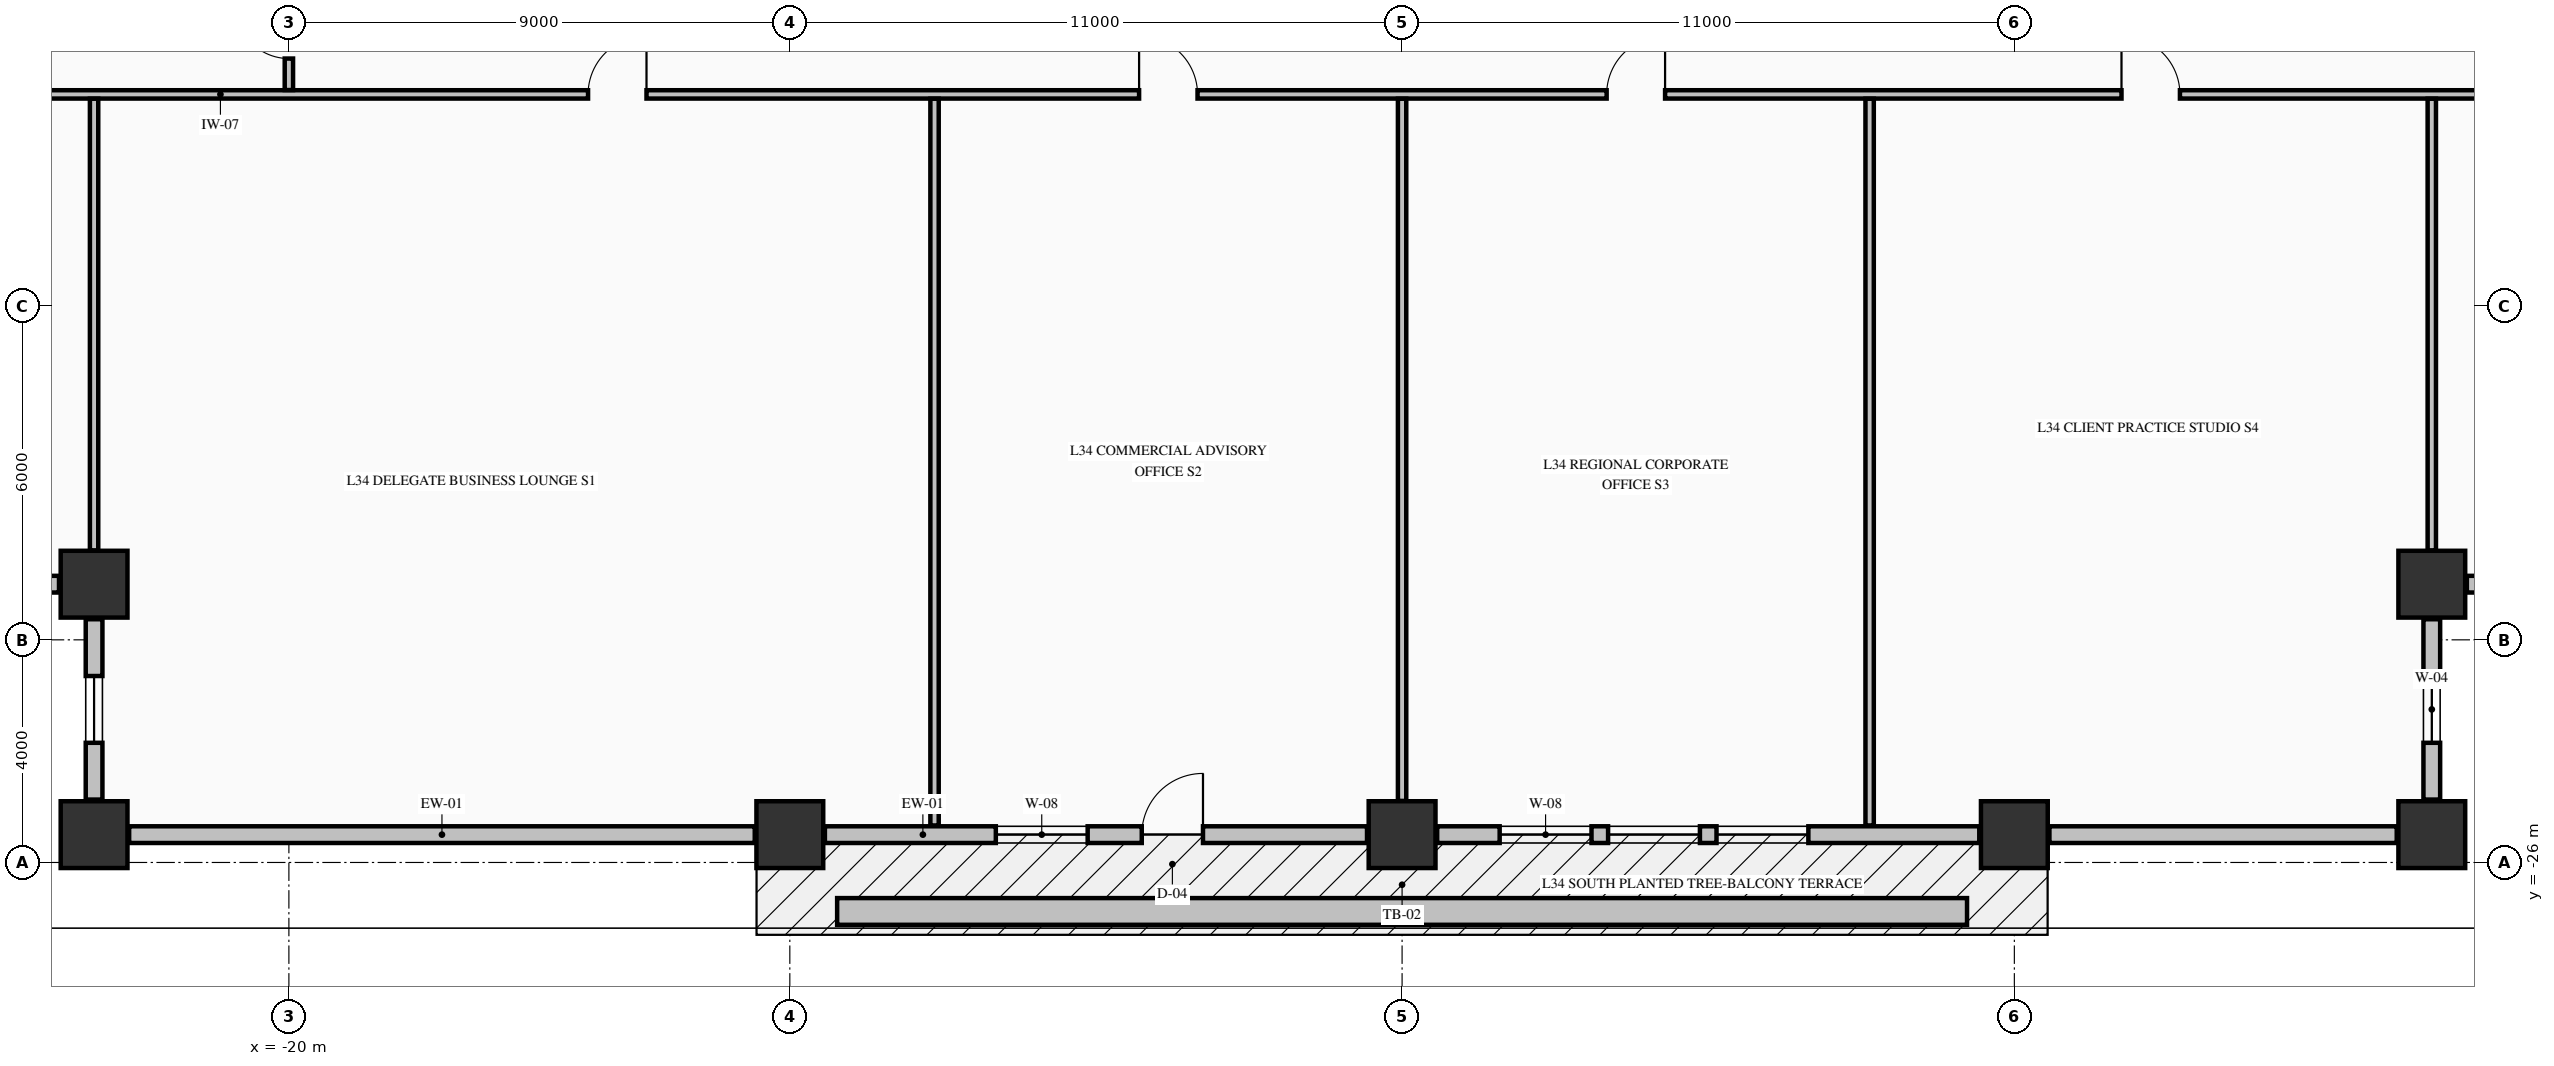
"""IFC4 building model, lengths in metres.
Left out: names, types, materials, properties, quantities, classifications, styles, units other than length and angle.
Written with IfcOpenShell. Run it as: python <this file> out.ifc"""

import sys

from ifc_helpers import new_model, si_unit, direction, frame, frame_2d, origin, origin_2d, place, context, subcontext, project, spatial, rectangle, extrude, element, fill, save


model = new_model("IFC4")
c1 = context("Model", 3, precision=1e-05, world=origin(), true_north=direction((0.0, 1.0)))
c2 = subcontext(c1, "Body", "Model", "MODEL_VIEW")
j1 = project(units=[si_unit("LENGTHUNIT", "METRE"), si_unit("PLANEANGLEUNIT", "RADIAN")], contexts=[c1])
p1 = place(None, origin())
s1 = spatial("IfcSite", under=j1, at=p1, CompositionType="ELEMENT")
p2 = place(p1, origin())
s2 = spatial("IfcBuilding", under=s1, at=p2, CompositionType="ELEMENT")
p3 = place(p2, frame((0.0, 0.0, 135.63)))
s3 = spatial("IfcBuildingStorey", under=s2, at=p3, CompositionType="ELEMENT", Elevation=135.63)
for number, where, z_axis, x_axis in (
    (1, (-23.5, -25.5, -0.25), (0.0, 0.0, 1.0), (1.0, 0.0, 0.0)),
    (2, (-11.0, -25.5, -0.25), (0.0, 0.0, 1.0), (1.0, 0.0, 0.0)),
    (3, (0.0, -25.5, -0.25), (0.0, 0.0, 1.0), (1.0, 0.0, 0.0)),
    (4, (11.0, -25.5, -0.25), (0.0, 0.0, 1.0), (1.0, 0.0, 0.0)),
    (5, (18.5, -25.5, -0.25), (0.0, 0.0, 1.0), (1.0, 0.0, 0.0)),
    (6, (-23.5, -21.0, -0.25), (0.0, 0.0, 1.0), (1.0, 0.0, 0.0)),
    (7, (18.5, -21.0, -0.25), (0.0, 0.0, 1.0), (1.0, 0.0, 0.0)),
):
    element("IfcColumn", number, at=place(p3, frame(where, z_axis=z_axis, x_axis=x_axis)), inside=s3, PredefinedType="COLUMN", context=c2, shape_type="SweptSolid", body=[
        extrude(rectangle(XDim=1.2, YDim=1.2, at=origin_2d()), origin(), (0.0, 0.0, 1.0), 3.57),
    ])
p4 = place(p3, frame((18.5, -24.87, 0.0), z_axis=(0.0, 0.0, 1.0), x_axis=(0.0, 1.0, 0.0)))
e8 = element("IfcWall", 8, at=p4, inside=s3, PredefinedType="STANDARD", context=c2, shape_type="SweptSolid", body=[
    extrude(rectangle(XDim=3.24, YDim=0.3, at=frame_2d((1.62, 0.0))), origin(), (0.0, 0.0, 1.0), 2.712),
])
p5 = place(p4, frame((1.02, 0.0, 0.82)))
e9 = element("IfcOpeningElement", 9, at=p5, cuts=e8, PredefinedType="OPENING", context=c2, shape_type="SweptSolid", body=[
    extrude(rectangle(XDim=1.2, YDim=1.65, at=frame_2d((0.6, 0.825))), frame((0.0, 0.16, 0.0), z_axis=(0.0, -1.0, 0.0), x_axis=(1.0, 0.0, 0.0)), (0.0, 0.0, 1.0), 0.32),
])
p6 = place(p3, frame((19.13, -21.0, 0.0), z_axis=(0.0, 0.0, 1.0), x_axis=(1.0, 0.0, 0.0)))
e10 = element("IfcWall", 10, at=p6, inside=s3, PredefinedType="STANDARD", context=c2, shape_type="SweptSolid", body=[
    extrude(rectangle(XDim=3.24, YDim=0.3, at=frame_2d((1.62, 0.0))), origin(), (0.0, 0.0, 1.0), 2.712),
])
p7 = place(p6, frame((1.02, 0.0, 0.82)))
e11 = element("IfcOpeningElement", 11, at=p7, cuts=e10, PredefinedType="OPENING", context=c2, shape_type="SweptSolid", body=[
    extrude(rectangle(XDim=1.2, YDim=1.65, at=frame_2d((0.6, 0.825))), frame((0.0, 0.16, 0.0), z_axis=(0.0, -1.0, 0.0), x_axis=(1.0, 0.0, 0.0)), (0.0, 0.0, 1.0), 0.32),
])
p8 = place(p3, frame((-27.37, -21.0, 0.0), z_axis=(0.0, 0.0, 1.0), x_axis=(1.0, 0.0, 0.0)))
e12 = element("IfcWall", 12, at=p8, inside=s3, PredefinedType="STANDARD", context=c2, shape_type="SweptSolid", body=[
    extrude(rectangle(XDim=3.24, YDim=0.3, at=frame_2d((1.62, 0.0))), origin(), (0.0, 0.0, 1.0), 2.712),
])
p9 = place(p8, frame((1.02, 0.0, 0.82)))
e13 = element("IfcOpeningElement", 13, at=p9, cuts=e12, PredefinedType="OPENING", context=c2, shape_type="SweptSolid", body=[
    extrude(rectangle(XDim=1.2, YDim=1.65, at=frame_2d((0.6, 0.825))), frame((0.0, 0.16, 0.0), z_axis=(0.0, -1.0, 0.0), x_axis=(1.0, 0.0, 0.0)), (0.0, 0.0, 1.0), 0.32),
])
p10 = place(p3, frame((-23.5, -21.63, 0.0), z_axis=(0.0, 0.0, 1.0), x_axis=(0.0, -1.0, 0.0)))
e14 = element("IfcWall", 14, at=p10, inside=s3, PredefinedType="STANDARD", context=c2, shape_type="SweptSolid", body=[
    extrude(rectangle(XDim=3.24, YDim=0.3, at=frame_2d((1.62, 0.0))), origin(), (0.0, 0.0, 1.0), 2.712),
])
p11 = place(p10, frame((1.02, 0.0, 0.82)))
e15 = element("IfcOpeningElement", 15, at=p11, cuts=e14, PredefinedType="OPENING", context=c2, shape_type="SweptSolid", body=[
    extrude(rectangle(XDim=1.2, YDim=1.65, at=frame_2d((0.6, 0.825))), frame((0.0, 0.16, 0.0), z_axis=(0.0, -1.0, 0.0), x_axis=(1.0, 0.0, 0.0)), (0.0, 0.0, 1.0), 0.32),
])
p12 = place(p3, frame((-22.87, -25.5, 0.0), z_axis=(0.0, 0.0, 1.0), x_axis=(1.0, 0.0, 0.0)))
e16 = element("IfcWall", 16, at=p12, inside=s3, PredefinedType="STANDARD", context=c2, shape_type="SweptSolid", body=[
    extrude(rectangle(XDim=11.24, YDim=0.3, at=frame_2d((5.62, 0.0))), origin(), (0.0, 0.0, 1.0), 2.712),
])
p13 = place(p3, frame((-10.37, -25.5, 0.0), z_axis=(0.0, 0.0, 1.0), x_axis=(1.0, 0.0, 0.0)))
e17 = element("IfcWall", 17, at=p13, inside=s3, PredefinedType="STANDARD", context=c2, shape_type="SweptSolid", body=[
    extrude(rectangle(XDim=9.74, YDim=0.3, at=frame_2d((4.87, 0.0))), origin(), (0.0, 0.0, 1.0), 2.712),
])
p14 = place(p13, frame((5.693, 0.0, 0.0)))
e18 = element("IfcOpeningElement", 18, at=p14, cuts=e17, PredefinedType="OPENING", context=c2, shape_type="SweptSolid", body=[
    extrude(rectangle(XDim=1.1, YDim=2.15, at=frame_2d((0.55, 1.075))), frame((0.0, 0.16, 0.0), z_axis=(0.0, -1.0, 0.0), x_axis=(1.0, 0.0, 0.0)), (0.0, 0.0, 1.0), 0.32),
])
p15 = place(p13, frame((3.071, 0.0, 0.8)))
e19 = element("IfcOpeningElement", 19, at=p15, cuts=e17, PredefinedType="OPENING", context=c2, shape_type="SweptSolid", body=[
    extrude(rectangle(XDim=1.65, YDim=1.7, at=frame_2d((0.825, 0.85))), frame((0.0, 0.16, 0.0), z_axis=(0.0, -1.0, 0.0), x_axis=(1.0, 0.0, 0.0)), (0.0, 0.0, 1.0), 0.32),
])
p16 = place(p3, frame((0.63, -25.5, 0.0), z_axis=(0.0, 0.0, 1.0), x_axis=(1.0, 0.0, 0.0)))
e20 = element("IfcWall", 20, at=p16, inside=s3, PredefinedType="STANDARD", context=c2, shape_type="SweptSolid", body=[
    extrude(rectangle(XDim=9.74, YDim=0.3, at=frame_2d((4.87, 0.0))), origin(), (0.0, 0.0, 1.0), 2.712),
])
p17 = place(p16, frame((1.123, 0.0, 0.8)))
e21 = element("IfcOpeningElement", 21, at=p17, cuts=e20, PredefinedType="OPENING", context=c2, shape_type="SweptSolid", body=[
    extrude(rectangle(XDim=1.65, YDim=1.7, at=frame_2d((0.825, 0.85))), frame((0.0, 0.16, 0.0), z_axis=(0.0, -1.0, 0.0), x_axis=(1.0, 0.0, 0.0)), (0.0, 0.0, 1.0), 0.32),
])
p18 = place(p16, frame((3.071, 0.0, 0.8)))
e22 = element("IfcOpeningElement", 22, at=p18, cuts=e20, PredefinedType="OPENING", context=c2, shape_type="SweptSolid", body=[
    extrude(rectangle(XDim=1.65, YDim=1.7, at=frame_2d((0.825, 0.85))), frame((0.0, 0.16, 0.0), z_axis=(0.0, -1.0, 0.0), x_axis=(1.0, 0.0, 0.0)), (0.0, 0.0, 1.0), 0.32),
])
p19 = place(p16, frame((5.019, 0.0, 0.8)))
e23 = element("IfcOpeningElement", 23, at=p19, cuts=e20, PredefinedType="OPENING", context=c2, shape_type="SweptSolid", body=[
    extrude(rectangle(XDim=1.65, YDim=1.7, at=frame_2d((0.825, 0.85))), frame((0.0, 0.16, 0.0), z_axis=(0.0, -1.0, 0.0), x_axis=(1.0, 0.0, 0.0)), (0.0, 0.0, 1.0), 0.32),
])
p20 = place(p3, frame((11.63, -25.5, 0.0), z_axis=(0.0, 0.0, 1.0), x_axis=(1.0, 0.0, 0.0)))
e24 = element("IfcWall", 24, at=p20, inside=s3, PredefinedType="STANDARD", context=c2, shape_type="SweptSolid", body=[
    extrude(rectangle(XDim=6.24, YDim=0.3, at=frame_2d((3.12, 0.0))), origin(), (0.0, 0.0, 1.0), 2.712),
])
p21 = place(p3, frame((-27.835, -12.2, 0.0), z_axis=(0.0, 0.0, 1.0), x_axis=(1.0, 0.0, 0.0)))
e25 = element("IfcWall", 25, at=p21, inside=s3, PredefinedType="PARTITIONING", context=c2, shape_type="SweptSolid", body=[
    extrude(rectangle(XDim=50.67, YDim=0.15, at=frame_2d((25.335, 0.0))), origin(), (0.0, 0.0, 1.0), 3.32),
])
p22 = place(p21, frame((13.21, 0.0, 0.0)))
e26 = element("IfcOpeningElement", 26, at=p22, cuts=e25, PredefinedType="OPENING", context=c2, shape_type="SweptSolid", body=[
    extrude(rectangle(XDim=1.05, YDim=2.15, at=frame_2d((0.525, 1.075))), frame((0.0, 0.085, 0.0), z_axis=(0.0, -1.0, 0.0), x_axis=(1.0, 0.0, 0.0)), (0.0, 0.0, 1.0), 0.17),
])
p23 = place(p21, frame((23.11, 0.0, 0.0)))
e27 = element("IfcOpeningElement", 27, at=p23, cuts=e25, PredefinedType="OPENING", context=c2, shape_type="SweptSolid", body=[
    extrude(rectangle(XDim=1.05, YDim=2.15, at=frame_2d((0.525, 1.075))), frame((0.0, 0.085, 0.0), z_axis=(0.0, -1.0, 0.0), x_axis=(1.0, 0.0, 0.0)), (0.0, 0.0, 1.0), 0.17),
])
p24 = place(p21, frame((31.51, 0.0, 0.0)))
e28 = element("IfcOpeningElement", 28, at=p24, cuts=e25, PredefinedType="OPENING", context=c2, shape_type="SweptSolid", body=[
    extrude(rectangle(XDim=1.05, YDim=2.15, at=frame_2d((0.525, 1.075))), frame((0.0, 0.085, 0.0), z_axis=(0.0, -1.0, 0.0), x_axis=(1.0, 0.0, 0.0)), (0.0, 0.0, 1.0), 0.17),
])
p25 = place(p21, frame((40.76, 0.0, 0.0)))
e29 = element("IfcOpeningElement", 29, at=p25, cuts=e25, PredefinedType="OPENING", context=c2, shape_type="SweptSolid", body=[
    extrude(rectangle(XDim=1.05, YDim=2.15, at=frame_2d((0.525, 1.075))), frame((0.0, 0.085, 0.0), z_axis=(0.0, -1.0, 0.0), x_axis=(1.0, 0.0, 0.0)), (0.0, 0.0, 1.0), 0.17),
])
p26 = place(p3, frame((-23.5, -20.394, 0.0), z_axis=(0.0, 0.0, 1.0), x_axis=(0.0, 1.0, 0.0)))
e30 = element("IfcWall", 30, at=p26, inside=s3, PredefinedType="PARTITIONING", context=c2, shape_type="SweptSolid", body=[
    extrude(rectangle(XDim=8.116, YDim=0.15, at=frame_2d((4.058, 0.0))), origin(), (0.0, 0.0, 1.0), 3.32),
])
p27 = place(p3, frame((-20.0, -12.122, 0.0), z_axis=(0.0, 0.0, 1.0), x_axis=(0.0, 1.0, 0.0)))
e31 = element("IfcWall", 31, at=p27, inside=s3, PredefinedType="PARTITIONING", context=c2, shape_type="SweptSolid", body=[
    extrude(rectangle(XDim=1.666, YDim=0.15, at=frame_2d((0.833, 0.0))), origin(), (0.0, 0.0, 1.0), 2.81),
])
p28 = place(p27, frame((0.566, 0.0, 0.0)))
e32 = element("IfcOpeningElement", 32, at=p28, cuts=e31, PredefinedType="OPENING", context=c2, shape_type="SweptSolid", body=[
    extrude(rectangle(XDim=0.95, YDim=2.15, at=frame_2d((0.475, 1.075))), frame((0.0, 0.085, 0.0), z_axis=(0.0, -1.0, 0.0), x_axis=(1.0, 0.0, 0.0)), (0.0, 0.0, 1.0), 0.17),
])
p29 = place(p3, frame((-8.4, -25.335, 0.0), z_axis=(0.0, 0.0, 1.0), x_axis=(0.0, 1.0, 0.0)))
e33 = element("IfcWall", 33, at=p29, inside=s3, PredefinedType="PARTITIONING", context=c2, shape_type="SweptSolid", body=[
    extrude(rectangle(XDim=13.057, YDim=0.15, at=frame_2d((6.528, 0.0))), origin(), (0.0, 0.0, 1.0), 3.32),
])
p30 = place(p3, frame((0.0, -24.894, 0.0), z_axis=(0.0, 0.0, 1.0), x_axis=(0.0, 1.0, 0.0)))
e34 = element("IfcWall", 34, at=p30, inside=s3, PredefinedType="PARTITIONING", context=c2, shape_type="SweptSolid", body=[
    extrude(rectangle(XDim=12.616, YDim=0.15, at=frame_2d((6.308, 0.0))), origin(), (0.0, 0.0, 1.0), 2.81),
])
p31 = place(p3, frame((8.4, -25.335, 0.0), z_axis=(0.0, 0.0, 1.0), x_axis=(0.0, 1.0, 0.0)))
e35 = element("IfcWall", 35, at=p31, inside=s3, PredefinedType="PARTITIONING", context=c2, shape_type="SweptSolid", body=[
    extrude(rectangle(XDim=13.057, YDim=0.15, at=frame_2d((6.528, 0.0))), origin(), (0.0, 0.0, 1.0), 3.32),
])
p32 = place(p3, frame((18.5, -20.394, 0.0), z_axis=(0.0, 0.0, 1.0), x_axis=(0.0, 1.0, 0.0)))
e36 = element("IfcWall", 36, at=p32, inside=s3, PredefinedType="PARTITIONING", context=c2, shape_type="SweptSolid", body=[
    extrude(rectangle(XDim=8.116, YDim=0.15, at=frame_2d((4.058, 0.0))), origin(), (0.0, 0.0, 1.0), 3.32),
])
p33 = place(p3, frame((-10.15, -26.88, -0.04), z_axis=(0.0, 0.0, 1.0), x_axis=(1.0, 0.0, 0.0)))
e37 = element("IfcWall", 37, at=p33, inside=s3, PredefinedType="PARAPET", context=c2, shape_type="SweptSolid", body=[
    extrude(rectangle(XDim=20.3, YDim=0.48, at=frame_2d((10.15, 0.0))), origin(), (0.0, 0.0, 1.0), 0.52),
])
p34 = place(p5, origin())
e38 = element("IfcWindow", 38, at=p34, inside=s3, PartitioningType="SINGLE_PANEL", PredefinedType="WINDOW", context=c2, shape_type="SweptSolid", body=[
    extrude(rectangle(XDim=1.2, YDim=1.65, at=frame_2d((0.6, 0.825))), frame((0.0, 0.03, 0.0), z_axis=(0.0, -1.0, 0.0), x_axis=(1.0, 0.0, 0.0)), (0.0, 0.0, 1.0), 0.06),
])
fill(e9, e38)
p35 = place(p11, origin())
e39 = element("IfcWindow", 39, at=p35, inside=s3, PartitioningType="SINGLE_PANEL", PredefinedType="WINDOW", context=c2, shape_type="SweptSolid", body=[
    extrude(rectangle(XDim=1.2, YDim=1.65, at=frame_2d((0.6, 0.825))), frame((0.0, 0.03, 0.0), z_axis=(0.0, -1.0, 0.0), x_axis=(1.0, 0.0, 0.0)), (0.0, 0.0, 1.0), 0.06),
])
fill(e15, e39)
p36 = place(p14, origin())
e40 = element("IfcDoor", 40, at=p36, inside=s3, OperationType="SINGLE_SWING_RIGHT", PredefinedType="DOOR", context=c2, shape_type="SweptSolid", body=[
    extrude(rectangle(XDim=1.1, YDim=2.15, at=frame_2d((0.55, 1.075))), frame((0.0, 0.025, 0.0), z_axis=(0.0, -1.0, 0.0), x_axis=(1.0, 0.0, 0.0)), (0.0, 0.0, 1.0), 0.05),
])
fill(e18, e40)
p37 = place(p15, origin())
e41 = element("IfcWindow", 41, at=p37, inside=s3, PartitioningType="SINGLE_PANEL", PredefinedType="WINDOW", context=c2, shape_type="SweptSolid", body=[
    extrude(rectangle(XDim=1.65, YDim=1.7, at=frame_2d((0.825, 0.85))), frame((0.0, 0.03, 0.0), z_axis=(0.0, -1.0, 0.0), x_axis=(1.0, 0.0, 0.0)), (0.0, 0.0, 1.0), 0.06),
])
fill(e19, e41)
p38 = place(p17, origin())
e42 = element("IfcWindow", 42, at=p38, inside=s3, PartitioningType="SINGLE_PANEL", PredefinedType="WINDOW", context=c2, shape_type="SweptSolid", body=[
    extrude(rectangle(XDim=1.65, YDim=1.7, at=frame_2d((0.825, 0.85))), frame((0.0, 0.03, 0.0), z_axis=(0.0, -1.0, 0.0), x_axis=(1.0, 0.0, 0.0)), (0.0, 0.0, 1.0), 0.06),
])
fill(e21, e42)
p39 = place(p18, origin())
e43 = element("IfcWindow", 43, at=p39, inside=s3, PartitioningType="SINGLE_PANEL", PredefinedType="WINDOW", context=c2, shape_type="SweptSolid", body=[
    extrude(rectangle(XDim=1.65, YDim=1.7, at=frame_2d((0.825, 0.85))), frame((0.0, 0.03, 0.0), z_axis=(0.0, -1.0, 0.0), x_axis=(1.0, 0.0, 0.0)), (0.0, 0.0, 1.0), 0.06),
])
fill(e22, e43)
p40 = place(p19, origin())
e44 = element("IfcWindow", 44, at=p40, inside=s3, PartitioningType="SINGLE_PANEL", PredefinedType="WINDOW", context=c2, shape_type="SweptSolid", body=[
    extrude(rectangle(XDim=1.65, YDim=1.7, at=frame_2d((0.825, 0.85))), frame((0.0, 0.03, 0.0), z_axis=(0.0, -1.0, 0.0), x_axis=(1.0, 0.0, 0.0)), (0.0, 0.0, 1.0), 0.06),
])
fill(e23, e44)
p41 = place(p22, origin())
e45 = element("IfcDoor", 45, at=p41, inside=s3, OperationType="SINGLE_SWING_RIGHT", PredefinedType="DOOR", context=c2, shape_type="SweptSolid", body=[
    extrude(rectangle(XDim=1.05, YDim=2.15, at=frame_2d((0.525, 1.075))), frame((0.0, 0.025, 0.0), z_axis=(0.0, -1.0, 0.0), x_axis=(1.0, 0.0, 0.0)), (0.0, 0.0, 1.0), 0.05),
])
fill(e26, e45)
p42 = place(p23, origin())
e46 = element("IfcDoor", 46, at=p42, inside=s3, OperationType="SINGLE_SWING_LEFT", PredefinedType="DOOR", context=c2, shape_type="SweptSolid", body=[
    extrude(rectangle(XDim=1.05, YDim=2.15, at=frame_2d((0.525, 1.075))), frame((0.0, 0.025, 0.0), z_axis=(0.0, -1.0, 0.0), x_axis=(1.0, 0.0, 0.0)), (0.0, 0.0, 1.0), 0.05),
])
fill(e27, e46)
p43 = place(p24, origin())
e47 = element("IfcDoor", 47, at=p43, inside=s3, OperationType="SINGLE_SWING_RIGHT", PredefinedType="DOOR", context=c2, shape_type="SweptSolid", body=[
    extrude(rectangle(XDim=1.05, YDim=2.15, at=frame_2d((0.525, 1.075))), frame((0.0, 0.025, 0.0), z_axis=(0.0, -1.0, 0.0), x_axis=(1.0, 0.0, 0.0)), (0.0, 0.0, 1.0), 0.05),
])
fill(e28, e47)
p44 = place(p25, origin())
e48 = element("IfcDoor", 48, at=p44, inside=s3, OperationType="SINGLE_SWING_LEFT", PredefinedType="DOOR", context=c2, shape_type="SweptSolid", body=[
    extrude(rectangle(XDim=1.05, YDim=2.15, at=frame_2d((0.525, 1.075))), frame((0.0, 0.025, 0.0), z_axis=(0.0, -1.0, 0.0), x_axis=(1.0, 0.0, 0.0)), (0.0, 0.0, 1.0), 0.05),
])
fill(e29, e48)
p45 = place(p28, origin())
e49 = element("IfcDoor", 49, at=p45, inside=s3, OperationType="SINGLE_SWING_RIGHT", PredefinedType="DOOR", context=c2, shape_type="SweptSolid", body=[
    extrude(rectangle(XDim=0.95, YDim=2.15, at=frame_2d((0.475, 1.075))), frame((0.0, 0.025, 0.0), z_axis=(0.0, -1.0, 0.0), x_axis=(1.0, 0.0, 0.0)), (0.0, 0.0, 1.0), 0.05),
])
fill(e32, e49)
save(model, sys.argv[1])
